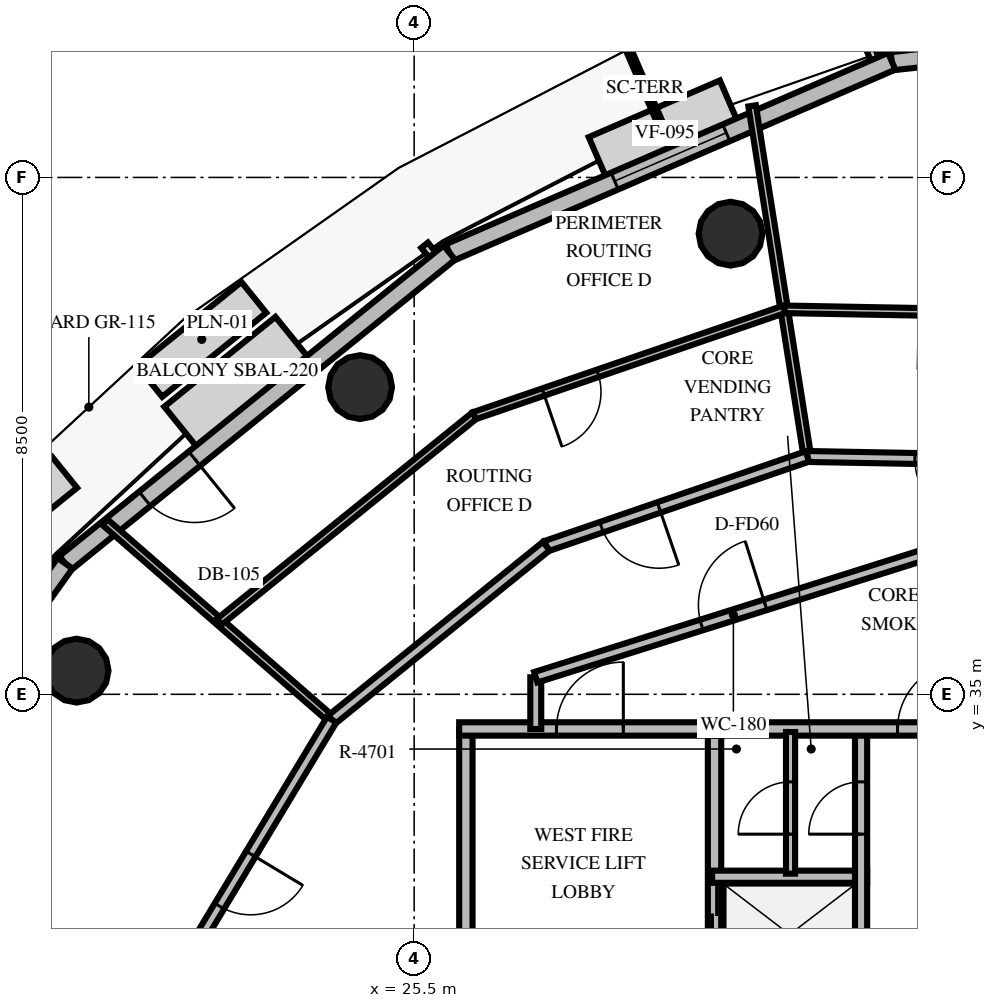
"""IFC4 building model, lengths in metres.
Left out: names, types, materials, properties, quantities, classifications, styles, units other than length and angle.
Written with IfcOpenShell. Run it as: python <this file> out.ifc"""

import sys

from ifc_helpers import new_model, si_unit, direction, frame, frame_2d, origin, origin_2d, place, context, subcontext, project, spatial, rectangle, circle, extrude, element, fill, save


model = new_model("IFC4")
c1 = context("Model", 3, precision=1e-05, world=origin(), true_north=direction((0.0, 1.0)))
c2 = subcontext(c1, "Body", "Model", "MODEL_VIEW")
j1 = project(units=[si_unit("LENGTHUNIT", "METRE"), si_unit("PLANEANGLEUNIT", "RADIAN")], contexts=[c1])
p1 = place(None, origin())
s1 = spatial("IfcSite", under=j1, at=p1, CompositionType="ELEMENT")
p2 = place(p1, origin())
s2 = spatial("IfcBuilding", under=s1, at=p2, CompositionType="ELEMENT")
p3 = place(p2, frame((0.0, 0.0, 195.2)))
s3 = spatial("IfcBuildingStorey", under=s2, at=p3, CompositionType="ELEMENT", Elevation=195.2)
for number, where, z_axis, x_axis in (
    (1, (30.703, 42.575, 0.0), (0.0, 0.0, 1.0), (1.0, 0.0, 0.0)),
    (2, (24.611, 40.052, 0.0), (0.0, 0.0, 1.0), (1.0, 0.0, 0.0)),
    (3, (19.948, 35.389, 0.0), (0.0, 0.0, 1.0), (1.0, 0.0, 0.0)),
):
    element("IfcColumn", number, at=place(p3, frame(where, z_axis=z_axis, x_axis=x_axis)), inside=s3, PredefinedType="COLUMN", context=c2, shape_type="SweptSolid", body=[
        extrude(circle(Radius=0.525, at=origin_2d()), origin(), (0.0, 0.0, 1.0), 3.6),
    ])
p4 = place(p3, frame((40.708, 46.217, 0.0), z_axis=(0.0, 0.0, 1.0), x_axis=(-0.994048036748, -0.108942648383, 0.0)))
e4 = element("IfcWall", 4, at=p4, inside=s3, PredefinedType="SOLIDWALL", context=c2, shape_type="SweptSolid", body=[
    extrude(rectangle(XDim=7.397, YDim=0.3, at=frame_2d((3.699, 0.0))), origin(), (0.0, 0.0, 1.0), 2.66),
])
p5 = place(p4, frame((2.699, 0.0, 0.8)))
e5 = element("IfcOpeningElement", 5, at=p5, cuts=e4, PredefinedType="OPENING", context=c2, shape_type="SweptSolid", body=[
    extrude(rectangle(XDim=2.0, YDim=1.85, at=frame_2d((1.0, 0.925))), frame((0.0, 0.16, 0.0), z_axis=(0.0, -1.0, 0.0), x_axis=(1.0, 0.0, 0.0)), (0.0, 0.0, 1.0), 0.32),
])
p6 = place(p3, frame((33.354, 45.411, 0.0), z_axis=(0.0, 0.0, 1.0), x_axis=(-0.917811240331, -0.397017036311, 0.0)))
e6 = element("IfcWall", 6, at=p6, inside=s3, PredefinedType="SOLIDWALL", context=c2, shape_type="SweptSolid", body=[
    extrude(rectangle(XDim=7.927, YDim=0.3, at=frame_2d((3.964, 0.0))), origin(), (0.0, 0.0, 1.0), 2.66),
])
p7 = place(p6, frame((2.964, 0.0, 0.8)))
e7 = element("IfcOpeningElement", 7, at=p7, cuts=e6, PredefinedType="OPENING", context=c2, shape_type="SweptSolid", body=[
    extrude(rectangle(XDim=2.0, YDim=1.85, at=frame_2d((1.0, 0.925))), frame((0.0, 0.16, 0.0), z_axis=(0.0, -1.0, 0.0), x_axis=(1.0, 0.0, 0.0)), (0.0, 0.0, 1.0), 0.32),
])
p8 = place(p3, frame((26.078, 42.264, 0.0), z_axis=(0.0, 0.0, 1.0), x_axis=(-0.777687524657, -0.628651027194, 0.0)))
e8 = element("IfcWall", 8, at=p8, inside=s3, PredefinedType="SOLIDWALL", context=c2, shape_type="SweptSolid", body=[
    extrude(rectangle(XDim=8.127, YDim=0.3, at=frame_2d((4.063, 0.0))), origin(), (0.0, 0.0, 1.0), 2.66),
])
p9 = place(p8, frame((5.39, 0.0, 0.0)))
e9 = element("IfcOpeningElement", 9, at=p9, cuts=e8, PredefinedType="OPENING", context=c2, shape_type="SweptSolid", body=[
    extrude(rectangle(XDim=1.05, YDim=2.15, at=frame_2d((0.525, 1.075))), frame((0.0, 0.16, 0.0), z_axis=(0.0, -1.0, 0.0), x_axis=(1.0, 0.0, 0.0)), (0.0, 0.0, 1.0), 0.32),
])
p10 = place(p3, frame((19.758, 37.155, 0.0), z_axis=(0.0, 0.0, 1.0), x_axis=(-0.580588320106, -0.814197274963, 0.0)))
e10 = element("IfcWall", 10, at=p10, inside=s3, PredefinedType="SOLIDWALL", context=c2, shape_type="SweptSolid", body=[
    extrude(rectangle(XDim=7.927, YDim=0.3, at=frame_2d((3.963, 0.0))), origin(), (0.0, 0.0, 1.0), 2.66),
])
p11 = place(p10, frame((2.964, 0.0, 0.8)))
e11 = element("IfcOpeningElement", 11, at=p11, cuts=e10, PredefinedType="OPENING", context=c2, shape_type="SweptSolid", body=[
    extrude(rectangle(XDim=2.0, YDim=1.85, at=frame_2d((1.0, 0.925))), frame((0.0, 0.16, 0.0), z_axis=(0.0, -1.0, 0.0), x_axis=(1.0, 0.0, 0.0)), (0.0, 0.0, 1.0), 0.32),
])
p12 = place(p3, frame((26.35, 30.05, 0.0), z_axis=(0.0, 0.0, 1.0), x_axis=(0.0, 1.0, 0.0)))
e12 = element("IfcWall", 12, at=p12, inside=s3, PredefinedType="SOLIDWALL", context=c2, shape_type="SweptSolid", body=[
    extrude(rectangle(XDim=4.38, YDim=0.22, at=frame_2d((2.19, 0.0))), origin(), (0.0, 0.0, 1.0), 2.46),
])
p13 = place(p3, frame((30.44, 30.05, 0.0), z_axis=(0.0, 0.0, 1.0), x_axis=(0.0, 1.0, 0.0)))
e13 = element("IfcWall", 13, at=p13, inside=s3, PredefinedType="SOLIDWALL", context=c2, shape_type="SweptSolid", body=[
    extrude(rectangle(XDim=4.38, YDim=0.22, at=frame_2d((2.19, 0.0))), origin(), (0.0, 0.0, 1.0), 2.46),
])
p14 = place(p13, frame((0.8, 0.0, 0.0)))
e14 = element("IfcOpeningElement", 14, at=p14, cuts=e13, PredefinedType="OPENING", context=c2, shape_type="SweptSolid", body=[
    extrude(rectangle(XDim=1.05, YDim=2.1, at=frame_2d((0.525, 1.05))), frame((0.0, 0.12, 0.0), z_axis=(0.0, -1.0, 0.0), x_axis=(1.0, 0.0, 0.0)), (0.0, 0.0, 1.0), 0.24),
])
p15 = place(p3, frame((26.24, 34.43, 0.0), z_axis=(0.0, 0.0, 1.0), x_axis=(1.0, 0.0, 0.0)))
e15 = element("IfcWall", 15, at=p15, inside=s3, PredefinedType="SOLIDWALL", context=c2, shape_type="SweptSolid", body=[
    extrude(rectangle(XDim=4.31, YDim=0.22, at=frame_2d((2.155, 0.0))), origin(), (0.0, 0.0, 1.0), 2.46),
])
p16 = place(p15, frame((1.6, 0.0, 0.0)))
e16 = element("IfcOpeningElement", 16, at=p16, cuts=e15, PredefinedType="OPENING", context=c2, shape_type="SweptSolid", body=[
    extrude(rectangle(XDim=1.1, YDim=2.15, at=frame_2d((0.55, 1.075))), frame((0.0, 0.12, 0.0), z_axis=(0.0, -1.0, 0.0), x_axis=(1.0, 0.0, 0.0)), (0.0, 0.0, 1.0), 0.24),
])
p17 = place(p3, frame((30.4, 32.0, 0.0), z_axis=(0.0, 0.0, 1.0), x_axis=(1.0, 0.0, 0.0)))
e17 = element("IfcWall", 17, at=p17, inside=s3, PredefinedType="SOLIDWALL", context=c2, shape_type="SweptSolid", body=[
    extrude(rectangle(XDim=2.55, YDim=0.2, at=frame_2d((1.275, 0.0))), origin(), (0.0, 0.0, 1.0), 2.46),
])
p18 = place(p3, frame((32.85, 30.05, 0.0), z_axis=(0.0, 0.0, 1.0), x_axis=(0.0, 1.0, 0.0)))
e18 = element("IfcWall", 18, at=p18, inside=s3, PredefinedType="SOLIDWALL", context=c2, shape_type="SweptSolid", body=[
    extrude(rectangle(XDim=4.38, YDim=0.2, at=frame_2d((2.19, 0.0))), origin(), (0.0, 0.0, 1.0), 2.46),
])
p19 = place(p18, frame((2.65, 0.0, 0.0)))
e19 = element("IfcOpeningElement", 19, at=p19, cuts=e18, PredefinedType="OPENING", context=c2, shape_type="SweptSolid", body=[
    extrude(rectangle(XDim=0.86, YDim=2.05, at=frame_2d((0.43, 1.025))), frame((0.0, 0.11, 0.0), z_axis=(0.0, -1.0, 0.0), x_axis=(1.0, 0.0, 0.0)), (0.0, 0.0, 1.0), 0.22),
])
p20 = place(p3, frame((30.44, 34.43, 0.0), z_axis=(0.0, 0.0, 1.0), x_axis=(1.0, 0.0, 0.0)))
e20 = element("IfcWall", 20, at=p20, inside=s3, PredefinedType="SOLIDWALL", context=c2, shape_type="SweptSolid", body=[
    extrude(rectangle(XDim=7.12, YDim=0.22, at=frame_2d((3.56, 0.0))), origin(), (0.0, 0.0, 1.0), 2.46),
])
p21 = place(p20, frame((3.01, 0.0, 0.0)))
e21 = element("IfcOpeningElement", 21, at=p21, cuts=e20, PredefinedType="OPENING", context=c2, shape_type="SweptSolid", body=[
    extrude(rectangle(XDim=1.1, YDim=2.15, at=frame_2d((0.55, 1.075))), frame((0.0, 0.12, 0.0), z_axis=(0.0, -1.0, 0.0), x_axis=(1.0, 0.0, 0.0)), (0.0, 0.0, 1.0), 0.24),
])
p22 = place(p3, frame((31.69, 32.05, 0.0), z_axis=(0.0, 0.0, 1.0), x_axis=(0.0, 1.0, 0.0)))
e22 = element("IfcWall", 22, at=p22, inside=s3, PredefinedType="PARTITIONING", context=c2, shape_type="SweptSolid", body=[
    extrude(rectangle(XDim=2.33, YDim=0.15, at=frame_2d((1.165, 0.0))), origin(), (0.0, 0.0, 1.0), 2.46),
])
p23 = place(p22, frame((0.65, 0.0, 0.0)))
e23 = element("IfcOpeningElement", 23, at=p23, cuts=e22, PredefinedType="OPENING", context=c2, shape_type="SweptSolid", body=[
    extrude(rectangle(XDim=0.86, YDim=2.05, at=frame_2d((0.43, 1.025))), frame((0.0, 0.085, 0.0), z_axis=(0.0, -1.0, 0.0), x_axis=(1.0, 0.0, 0.0)), (0.0, 0.0, 1.0), 0.17),
])
p24 = place(p3, frame((27.5, 34.43, 0.0), z_axis=(0.0, 0.0, 1.0), x_axis=(0.0, 1.0, 0.0)))
e24 = element("IfcWall", 24, at=p24, inside=s3, PredefinedType="PARTITIONING", context=c2, shape_type="SweptSolid", body=[
    extrude(rectangle(XDim=0.85, YDim=0.18, at=frame_2d((0.425, 0.0))), origin(), (0.0, 0.0, 1.0), 2.46),
])
p25 = place(p3, frame((27.5, 35.28, 0.0), z_axis=(0.0, 0.0, 1.0), x_axis=(0.953691418528, 0.300786765376, 0.0)))
e25 = element("IfcWall", 25, at=p25, inside=s3, PredefinedType="PARTITIONING", context=c2, shape_type="SweptSolid", body=[
    extrude(rectangle(XDim=6.816, YDim=0.18, at=frame_2d((3.408, 0.0))), origin(), (0.0, 0.0, 1.0), 2.46),
])
p26 = place(p25, frame((2.858, 0.0, 0.0)))
e26 = element("IfcOpeningElement", 26, at=p26, cuts=e25, PredefinedType="OPENING", context=c2, shape_type="SweptSolid", body=[
    extrude(rectangle(XDim=1.1, YDim=2.15, at=frame_2d((0.55, 1.075))), frame((0.0, 0.1, 0.0), z_axis=(0.0, -1.0, 0.0), x_axis=(1.0, 0.0, 0.0)), (0.0, 0.0, 1.0), 0.2),
])
p27 = place(p3, frame((31.967, 38.911, 0.0), z_axis=(0.0, 0.0, 1.0), x_axis=(-0.155588850642, 0.987821901739, 0.0)))
e27 = element("IfcWall", 27, at=p27, inside=s3, PredefinedType="PARTITIONING", context=c2, shape_type="SweptSolid", body=[
    extrude(rectangle(XDim=5.837, YDim=0.125, at=frame_2d((2.918, 0.0))), origin(), (0.0, 0.0, 1.0), 2.46),
])
p28 = place(p3, frame((36.505, 38.828, 0.0), z_axis=(0.0, 0.0, 1.0), x_axis=(-0.999831787945, 0.018341096331, 0.0)))
e28 = element("IfcWall", 28, at=p28, inside=s3, PredefinedType="PARTITIONING", context=c2, shape_type="SweptSolid", body=[
    extrude(rectangle(XDim=4.539, YDim=0.18, at=frame_2d((2.27, 0.0))), origin(), (0.0, 0.0, 1.0), 2.46),
])
p29 = place(p28, frame((1.77, 0.0, 0.0)))
e29 = element("IfcOpeningElement", 29, at=p29, cuts=e28, PredefinedType="OPENING", context=c2, shape_type="SweptSolid", body=[
    extrude(rectangle(XDim=1.0, YDim=2.15, at=frame_2d((0.5, 1.075))), frame((0.0, 0.1, 0.0), z_axis=(0.0, -1.0, 0.0), x_axis=(1.0, 0.0, 0.0)), (0.0, 0.0, 1.0), 0.2),
])
p30 = place(p3, frame((36.975, 41.232, 0.0), z_axis=(0.0, 0.0, 1.0), x_axis=(-0.999832559092, 0.018299010323, 0.0)))
e30 = element("IfcWall", 30, at=p30, inside=s3, PredefinedType="PARTITIONING", context=c2, shape_type="SweptSolid", body=[
    extrude(rectangle(XDim=5.39, YDim=0.125, at=frame_2d((2.695, 0.0))), origin(), (0.0, 0.0, 1.0), 2.46),
])
p31 = place(p30, frame((2.22, 0.0, 0.0)))
e31 = element("IfcOpeningElement", 31, at=p31, cuts=e30, PredefinedType="OPENING", context=c2, shape_type="SweptSolid", body=[
    extrude(rectangle(XDim=0.95, YDim=2.15, at=frame_2d((0.475, 1.075))), frame((0.0, 0.073, 0.0), z_axis=(0.0, -1.0, 0.0), x_axis=(1.0, 0.0, 0.0)), (0.0, 0.0, 1.0), 0.145),
])
p32 = place(p3, frame((24.143, 34.583, 0.0), z_axis=(0.0, 0.0, 1.0), x_axis=(-0.754104479033, 0.656754470638, 0.0)))
e32 = element("IfcWall", 32, at=p32, inside=s3, PredefinedType="PARTITIONING", context=c2, shape_type="SweptSolid", body=[
    extrude(rectangle(XDim=4.943, YDim=0.125, at=frame_2d((2.472, 0.0))), origin(), (0.0, 0.0, 1.0), 2.46),
])
p33 = place(p3, frame((31.967, 38.911, 0.0), z_axis=(0.0, 0.0, 1.0), x_axis=(-0.945799700753, -0.324750559747, 0.0)))
e33 = element("IfcWall", 33, at=p33, inside=s3, PredefinedType="PARTITIONING", context=c2, shape_type="SweptSolid", body=[
    extrude(rectangle(XDim=4.539, YDim=0.18, at=frame_2d((2.27, 0.0))), origin(), (0.0, 0.0, 1.0), 2.46),
])
p34 = place(p33, frame((2.579, 0.0, 0.0)))
e34 = element("IfcOpeningElement", 34, at=p34, cuts=e33, PredefinedType="OPENING", context=c2, shape_type="SweptSolid", body=[
    extrude(rectangle(XDim=1.0, YDim=2.15, at=frame_2d((0.5, 1.075))), frame((0.0, 0.1, 0.0), z_axis=(0.0, -1.0, 0.0), x_axis=(1.0, 0.0, 0.0)), (0.0, 0.0, 1.0), 0.2),
])
p35 = place(p3, frame((27.674, 37.437, 0.0), z_axis=(0.0, 0.0, 1.0), x_axis=(-0.777710585506, -0.62862249816, 0.0)))
e35 = element("IfcWall", 35, at=p35, inside=s3, PredefinedType="PARTITIONING", context=c2, shape_type="SweptSolid", body=[
    extrude(rectangle(XDim=4.539, YDim=0.18, at=frame_2d((2.27, 0.0))), origin(), (0.0, 0.0, 1.0), 2.46),
])
p36 = place(p3, frame((31.585, 41.331, 0.0), z_axis=(0.0, 0.0, 1.0), x_axis=(-0.945809679089, -0.324721497504, 0.0)))
e36 = element("IfcWall", 36, at=p36, inside=s3, PredefinedType="PARTITIONING", context=c2, shape_type="SweptSolid", body=[
    extrude(rectangle(XDim=5.39, YDim=0.125, at=frame_2d((2.695, 0.0))), origin(), (0.0, 0.0, 1.0), 2.46),
])
p37 = place(p36, frame((3.24, 0.0, 0.0)))
e37 = element("IfcOpeningElement", 37, at=p37, cuts=e36, PredefinedType="OPENING", context=c2, shape_type="SweptSolid", body=[
    extrude(rectangle(XDim=0.95, YDim=2.15, at=frame_2d((0.475, 1.075))), frame((0.0, 0.073, 0.0), z_axis=(0.0, -1.0, 0.0), x_axis=(1.0, 0.0, 0.0)), (0.0, 0.0, 1.0), 0.145),
])
p38 = place(p3, frame((26.488, 39.581, 0.0), z_axis=(0.0, 0.0, 1.0), x_axis=(-0.777681383414, -0.628658624288, 0.0)))
e38 = element("IfcWall", 38, at=p38, inside=s3, PredefinedType="PARTITIONING", context=c2, shape_type="SweptSolid", body=[
    extrude(rectangle(XDim=5.39, YDim=0.125, at=frame_2d((2.695, 0.0))), origin(), (0.0, 0.0, 1.0), 2.46),
])
p39 = place(p3, frame((24.143, 34.583, 0.0), z_axis=(0.0, 0.0, 1.0), x_axis=(-0.515768687054, -0.856727880633, 0.0)))
e39 = element("IfcWall", 39, at=p39, inside=s3, PredefinedType="PARTITIONING", context=c2, shape_type="SweptSolid", body=[
    extrude(rectangle(XDim=4.539, YDim=0.18, at=frame_2d((2.27, 0.0))), origin(), (0.0, 0.0, 1.0), 2.46),
])
p40 = place(p39, frame((2.579, 0.0, 0.0)))
e40 = element("IfcOpeningElement", 40, at=p40, cuts=e39, PredefinedType="OPENING", context=c2, shape_type="SweptSolid", body=[
    extrude(rectangle(XDim=1.0, YDim=2.15, at=frame_2d((0.5, 1.075))), frame((0.0, 0.1, 0.0), z_axis=(0.0, -1.0, 0.0), x_axis=(1.0, 0.0, 0.0)), (0.0, 0.0, 1.0), 0.2),
])
p41 = place(p7, origin())
e41 = element("IfcWindow", 41, at=p41, inside=s3, PartitioningType="SINGLE_PANEL", PredefinedType="WINDOW", context=c2, shape_type="SweptSolid", body=[
    extrude(rectangle(XDim=2.0, YDim=1.85, at=frame_2d((1.0, 0.925))), frame((0.0, 0.03, 0.0), z_axis=(0.0, -1.0, 0.0), x_axis=(1.0, 0.0, 0.0)), (0.0, 0.0, 1.0), 0.06),
])
fill(e7, e41)
p42 = place(p9, origin())
e42 = element("IfcDoor", 42, at=p42, inside=s3, OperationType="SINGLE_SWING_LEFT", PredefinedType="DOOR", context=c2, shape_type="SweptSolid", body=[
    extrude(rectangle(XDim=1.05, YDim=2.15, at=frame_2d((0.525, 1.075))), frame((0.0, 0.025, 0.0), z_axis=(0.0, -1.0, 0.0), x_axis=(1.0, 0.0, 0.0)), (0.0, 0.0, 1.0), 0.05),
])
fill(e9, e42)
p43 = place(p16, origin())
e43 = element("IfcDoor", 43, at=p43, inside=s3, OperationType="SINGLE_SWING_RIGHT", PredefinedType="DOOR", context=c2, shape_type="SweptSolid", body=[
    extrude(rectangle(XDim=1.1, YDim=2.15, at=frame_2d((0.55, 1.075))), frame((0.0, 0.025, 0.0), z_axis=(0.0, -1.0, 0.0), x_axis=(1.0, 0.0, 0.0)), (0.0, 0.0, 1.0), 0.05),
])
fill(e16, e43)
p44 = place(p14, origin())
e44 = element("IfcDoor", 44, at=p44, inside=s3, OperationType="DOUBLE_DOOR_SLIDING", PredefinedType="USERDEFINED", context=c2, shape_type="SweptSolid", body=[
    extrude(rectangle(XDim=1.05, YDim=2.1, at=frame_2d((0.525, 1.05))), frame((0.0, 0.025, 0.0), z_axis=(0.0, -1.0, 0.0), x_axis=(1.0, 0.0, 0.0)), (0.0, 0.0, 1.0), 0.05),
])
fill(e14, e44)
p45 = place(p19, origin())
e45 = element("IfcDoor", 45, at=p45, inside=s3, OperationType="SINGLE_SWING_LEFT", PredefinedType="TRAPDOOR", context=c2, shape_type="SweptSolid", body=[
    extrude(rectangle(XDim=0.86, YDim=2.05, at=frame_2d((0.43, 1.025))), frame((0.0, 0.025, 0.0), z_axis=(0.0, -1.0, 0.0), x_axis=(1.0, 0.0, 0.0)), (0.0, 0.0, 1.0), 0.05),
])
fill(e19, e45)
p46 = place(p21, origin())
e46 = element("IfcDoor", 46, at=p46, inside=s3, OperationType="SINGLE_SWING_RIGHT", PredefinedType="DOOR", context=c2, shape_type="SweptSolid", body=[
    extrude(rectangle(XDim=1.1, YDim=2.15, at=frame_2d((0.55, 1.075))), frame((0.0, 0.025, 0.0), z_axis=(0.0, -1.0, 0.0), x_axis=(1.0, 0.0, 0.0)), (0.0, 0.0, 1.0), 0.05),
])
fill(e21, e46)
p47 = place(p23, origin())
e47 = element("IfcDoor", 47, at=p47, inside=s3, OperationType="SINGLE_SWING_LEFT", PredefinedType="TRAPDOOR", context=c2, shape_type="SweptSolid", body=[
    extrude(rectangle(XDim=0.86, YDim=2.05, at=frame_2d((0.43, 1.025))), frame((0.0, 0.025, 0.0), z_axis=(0.0, -1.0, 0.0), x_axis=(1.0, 0.0, 0.0)), (0.0, 0.0, 1.0), 0.05),
])
fill(e23, e47)
p48 = place(p26, origin())
e48 = element("IfcDoor", 48, at=p48, inside=s3, OperationType="SINGLE_SWING_RIGHT", PredefinedType="DOOR", context=c2, shape_type="SweptSolid", body=[
    extrude(rectangle(XDim=1.1, YDim=2.15, at=frame_2d((0.55, 1.075))), frame((0.0, 0.025, 0.0), z_axis=(0.0, -1.0, 0.0), x_axis=(1.0, 0.0, 0.0)), (0.0, 0.0, 1.0), 0.05),
])
fill(e26, e48)
p49 = place(p29, origin())
e49 = element("IfcDoor", 49, at=p49, inside=s3, OperationType="SINGLE_SWING_LEFT", PredefinedType="DOOR", context=c2, shape_type="SweptSolid", body=[
    extrude(rectangle(XDim=1.0, YDim=2.15, at=frame_2d((0.5, 1.075))), frame((0.0, 0.025, 0.0), z_axis=(0.0, -1.0, 0.0), x_axis=(1.0, 0.0, 0.0)), (0.0, 0.0, 1.0), 0.05),
])
fill(e29, e49)
p50 = place(p34, origin())
e50 = element("IfcDoor", 50, at=p50, inside=s3, OperationType="SINGLE_SWING_LEFT", PredefinedType="DOOR", context=c2, shape_type="SweptSolid", body=[
    extrude(rectangle(XDim=1.0, YDim=2.15, at=frame_2d((0.5, 1.075))), frame((0.0, 0.025, 0.0), z_axis=(0.0, -1.0, 0.0), x_axis=(1.0, 0.0, 0.0)), (0.0, 0.0, 1.0), 0.05),
])
fill(e34, e50)
p51 = place(p37, origin())
e51 = element("IfcDoor", 51, at=p51, inside=s3, OperationType="SINGLE_SWING_RIGHT", PredefinedType="DOOR", context=c2, shape_type="SweptSolid", body=[
    extrude(rectangle(XDim=0.95, YDim=2.15, at=frame_2d((0.475, 1.075))), frame((0.0, 0.025, 0.0), z_axis=(0.0, -1.0, 0.0), x_axis=(1.0, 0.0, 0.0)), (0.0, 0.0, 1.0), 0.05),
])
fill(e37, e51)
p52 = place(p40, origin())
e52 = element("IfcDoor", 52, at=p52, inside=s3, OperationType="SINGLE_SWING_LEFT", PredefinedType="DOOR", context=c2, shape_type="SweptSolid", body=[
    extrude(rectangle(XDim=1.0, YDim=2.15, at=frame_2d((0.5, 1.075))), frame((0.0, 0.025, 0.0), z_axis=(0.0, -1.0, 0.0), x_axis=(1.0, 0.0, 0.0)), (0.0, 0.0, 1.0), 0.05),
])
fill(e40, e52)
save(model, sys.argv[1])
